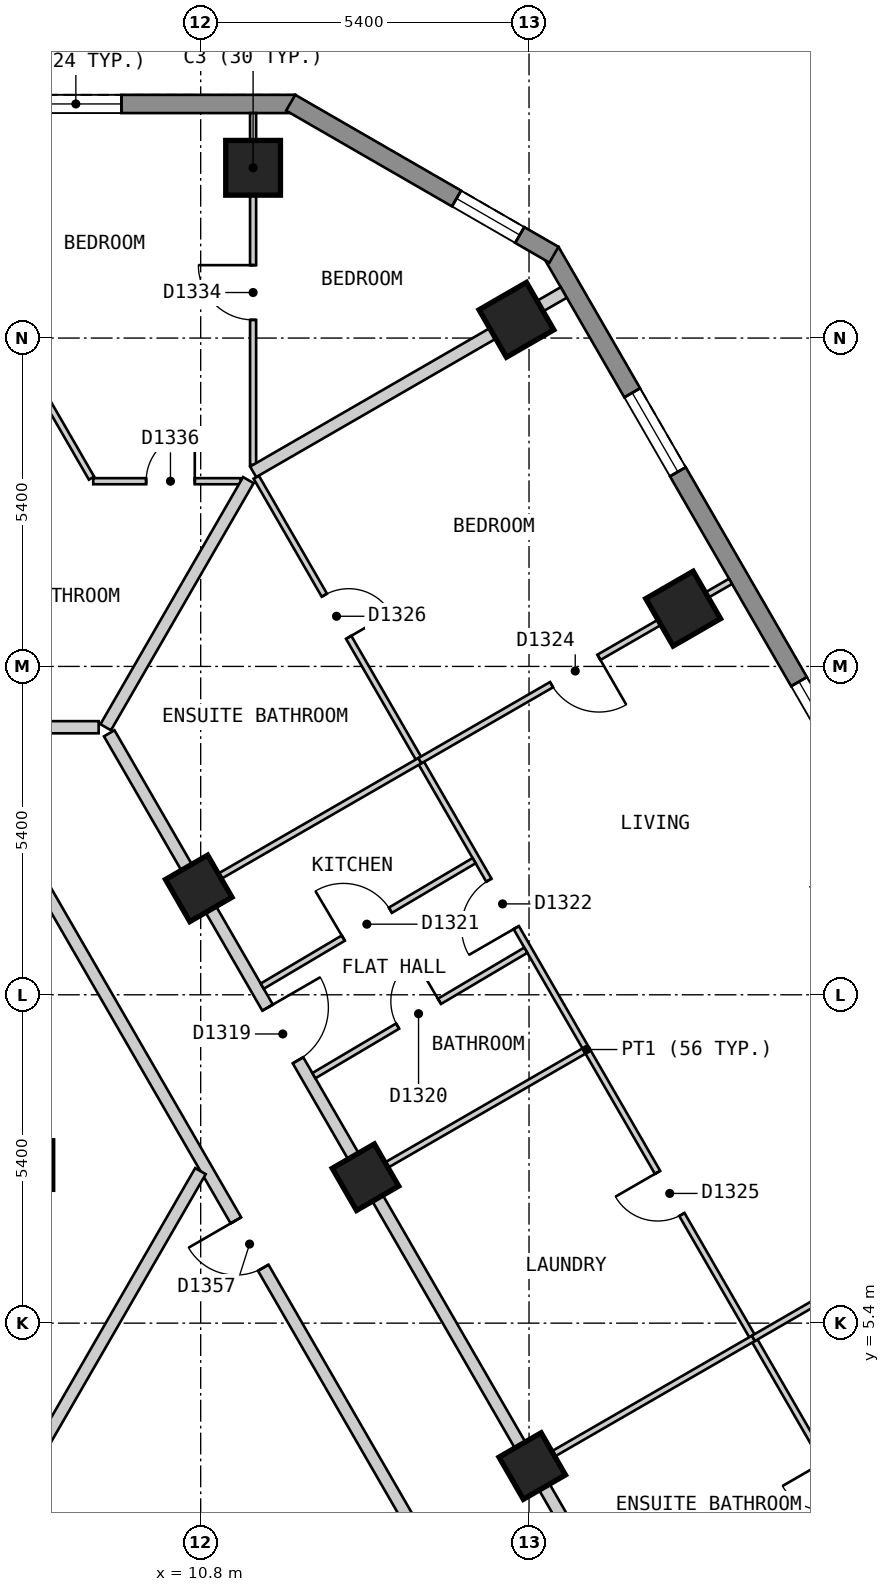
"""IFC4 building model, lengths in metres.
Left out: names, types, materials, properties, quantities, classifications, styles, units other than length and angle.
Written with IfcOpenShell. Run it as: python <this file> out.ifc"""

import sys

from ifc_helpers import new_model, si_unit, direction, frame, frame_2d, origin, origin_2d, place, context, subcontext, project, spatial, polyline, rectangle, outline, extrude, element, fill, save


model = new_model("IFC4")
c1 = context("Model", 3, precision=1e-05, world=origin(), true_north=direction((0.0, 1.0)))
c2 = subcontext(c1, "Body", "Model", "MODEL_VIEW")
j1 = project(units=[si_unit("LENGTHUNIT", "METRE"), si_unit("PLANEANGLEUNIT", "RADIAN")], contexts=[c1])
p1 = place(None, origin())
s1 = spatial("IfcSite", under=j1, at=p1, CompositionType="ELEMENT")
p2 = place(p1, origin())
s2 = spatial("IfcBuilding", under=s1, at=p2, CompositionType="ELEMENT")
p3 = place(p2, frame((0.0, 0.0, 147.6)))
s3 = spatial("IfcBuildingStorey", under=s2, at=p3, CompositionType="ELEMENT", Elevation=147.6)
for number, where, z_axis, x_axis in (
    (1, (11.662, 24.4, 0.0), (0.0, 0.0, 1.0), (-1.0, 0.0, 0.0)),
    (2, (18.735, 17.15, 0.0), (0.0, 0.0, 1.0), (-0.5, 0.866, 0.0)),
    (3, (15.993, 21.9, 0.0), (0.0, 0.0, 1.0), (-0.5, 0.866, 0.0)),
):
    element("IfcColumn", number, at=place(p3, frame(where, z_axis=z_axis, x_axis=x_axis)), inside=s3, PredefinedType="COLUMN", context=c2, shape_type="SweptSolid", body=[
        extrude(rectangle(XDim=0.9, YDim=0.9, at=origin_2d()), origin(), (0.0, 0.0, 1.0), 3.0),
    ])
for number, where, z_axis, x_axis in (
    (4, (16.253, 3.05, 0.0), (0.0, 0.0, 1.0), (-0.5, 0.866, 0.0)),
    (5, (13.51, 7.8, 0.0), (0.0, 0.0, 1.0), (-0.5, 0.866, 0.0)),
    (6, (7.967, 8.0, 0.0), (0.0, 0.0, 1.0), (1.0, 0.0, 0.0)),
    (7, (10.768, 12.55, 0.0), (0.0, 0.0, 1.0), (-0.5, 0.866, 0.0)),
):
    element("IfcColumn", number, at=place(p3, frame(where, z_axis=z_axis, x_axis=x_axis)), inside=s3, PredefinedType="COLUMN", context=c2, shape_type="SweptSolid", body=[
        extrude(rectangle(XDim=0.8, YDim=0.8, at=origin_2d()), origin(), (0.0, 0.0, 1.0), 3.0),
    ])
p4 = place(p3, frame((12.355, 25.45, 0.0), z_axis=(0.0, 0.0, 1.0), x_axis=(-1.0, 0.0, 0.0)))
e8 = element("IfcWall", 8, at=p4, inside=s3, PredefinedType="SOLIDWALL", context=c2, shape_type="SweptSolid", body=[
    extrude(outline(polyline([(0.0, -0.15), (24.71, -0.15), (24.63, 0.15), (0.08, 0.15), (0.0, -0.15)])), origin(), (0.0, 0.0, 1.0), 2.7),
])
p5 = place(p4, frame((2.858, 0.0, 0.15)))
e9 = element("IfcOpeningElement", 9, at=p5, cuts=e8, PredefinedType="OPENING", context=c2, shape_type="SweptSolid", body=[
    extrude(rectangle(XDim=1.5, YDim=2.1, at=frame_2d((0.75, 1.05))), frame((0.0, 0.16, 0.0), z_axis=(0.0, -1.0, 0.0), x_axis=(1.0, 0.0, 0.0)), (0.0, 0.0, 1.0), 0.32),
])
p6 = place(p4, frame((8.689, 0.0, 0.15)))
e10 = element("IfcOpeningElement", 10, at=p6, cuts=e8, PredefinedType="OPENING", context=c2, shape_type="SweptSolid", body=[
    extrude(rectangle(XDim=1.5, YDim=2.1, at=frame_2d((0.75, 1.05))), frame((0.0, 0.16, 0.0), z_axis=(0.0, -1.0, 0.0), x_axis=(1.0, 0.0, 0.0)), (0.0, 0.0, 1.0), 0.32),
])
p7 = place(p4, frame((14.521, 0.0, 0.15)))
e11 = element("IfcOpeningElement", 11, at=p7, cuts=e8, PredefinedType="OPENING", context=c2, shape_type="SweptSolid", body=[
    extrude(rectangle(XDim=1.5, YDim=2.1, at=frame_2d((0.75, 1.05))), frame((0.0, 0.16, 0.0), z_axis=(0.0, -1.0, 0.0), x_axis=(1.0, 0.0, 0.0)), (0.0, 0.0, 1.0), 0.32),
])
p8 = place(p4, frame((20.352, 0.0, 0.15)))
e12 = element("IfcOpeningElement", 12, at=p8, cuts=e8, PredefinedType="OPENING", context=c2, shape_type="SweptSolid", body=[
    extrude(rectangle(XDim=1.5, YDim=2.1, at=frame_2d((0.75, 1.05))), frame((0.0, 0.16, 0.0), z_axis=(0.0, -1.0, 0.0), x_axis=(1.0, 0.0, 0.0)), (0.0, 0.0, 1.0), 0.32),
])
p9 = place(p3, frame((28.218, 2.825, 0.0), z_axis=(0.0, 0.0, 1.0), x_axis=(-0.500020536353, 0.866013546791, 0.0)))
e13 = element("IfcWall", 13, at=p9, inside=s3, PredefinedType="SOLIDWALL", context=c2, shape_type="SweptSolid", body=[
    extrude(outline(polyline([(0.0, -0.15), (23.325, -0.15), (23.245, 0.15), (0.08, 0.15), (0.0, -0.15)])), origin(), (0.0, 0.0, 1.0), 2.7),
])
p10 = place(p9, frame((2.685, 0.0, 0.15)))
e14 = element("IfcOpeningElement", 14, at=p10, cuts=e13, PredefinedType="OPENING", context=c2, shape_type="SweptSolid", body=[
    extrude(rectangle(XDim=1.5, YDim=2.1, at=frame_2d((0.75, 1.05))), frame((0.0, 0.16, 0.0), z_axis=(0.0, -1.0, 0.0), x_axis=(1.0, 0.0, 0.0)), (0.0, 0.0, 1.0), 0.32),
])
p11 = place(p9, frame((8.17, 0.0, 0.15)))
e15 = element("IfcOpeningElement", 15, at=p11, cuts=e13, PredefinedType="OPENING", context=c2, shape_type="SweptSolid", body=[
    extrude(rectangle(XDim=1.5, YDim=2.1, at=frame_2d((0.75, 1.05))), frame((0.0, 0.16, 0.0), z_axis=(0.0, -1.0, 0.0), x_axis=(1.0, 0.0, 0.0)), (0.0, 0.0, 1.0), 0.32),
])
p12 = place(p9, frame((13.655, 0.0, 0.15)))
e16 = element("IfcOpeningElement", 16, at=p12, cuts=e13, PredefinedType="OPENING", context=c2, shape_type="SweptSolid", body=[
    extrude(rectangle(XDim=1.5, YDim=2.1, at=frame_2d((0.75, 1.05))), frame((0.0, 0.16, 0.0), z_axis=(0.0, -1.0, 0.0), x_axis=(1.0, 0.0, 0.0)), (0.0, 0.0, 1.0), 0.32),
])
p13 = place(p9, frame((19.14, 0.0, 0.15)))
e17 = element("IfcOpeningElement", 17, at=p13, cuts=e13, PredefinedType="OPENING", context=c2, shape_type="SweptSolid", body=[
    extrude(rectangle(XDim=1.5, YDim=2.1, at=frame_2d((0.75, 1.05))), frame((0.0, 0.16, 0.0), z_axis=(0.0, -1.0, 0.0), x_axis=(1.0, 0.0, 0.0)), (0.0, 0.0, 1.0), 0.32),
])
p14 = place(p3, frame((16.61, 22.97, 0.0), z_axis=(0.0, 0.0, 1.0), x_axis=(-0.866022959057, 0.500004234368, 0.0)))
e18 = element("IfcWall", 18, at=p14, inside=s3, PredefinedType="SOLIDWALL", context=c2, shape_type="SweptSolid", body=[
    extrude(outline(polyline([(0.0, -0.15), (5.0, -0.15), (4.92, 0.15), (0.08, 0.15), (0.0, -0.15)])), origin(), (0.0, 0.0, 1.0), 2.7),
])
p15 = place(p14, frame((0.65, 0.0, 0.15)))
e19 = element("IfcOpeningElement", 19, at=p15, cuts=e18, PredefinedType="OPENING", context=c2, shape_type="SweptSolid", body=[
    extrude(rectangle(XDim=1.2, YDim=2.1, at=frame_2d((0.6, 1.05))), frame((0.0, 0.16, 0.0), z_axis=(0.0, -1.0, 0.0), x_axis=(1.0, 0.0, 0.0)), (0.0, 0.0, 1.0), 0.32),
])
p16 = place(p3, frame((7.967, 13.0, 0.0), z_axis=(0.0, 0.0, 1.0), x_axis=(0.50003774998, -0.866003607726, 0.0)))
e20 = element("IfcWall", 20, at=p16, inside=s3, PredefinedType="PARTITIONING", context=c2, shape_type="SweptSolid", body=[
    extrude(rectangle(XDim=14.433, YDim=0.2, at=frame_2d((7.217, 0.0))), origin(), (0.0, 0.0, 1.0), 2.7),
])
p17 = place(p16, frame((6.824, 0.0, 0.0)))
e21 = element("IfcOpeningElement", 21, at=p17, cuts=e20, PredefinedType="OPENING", context=c2, shape_type="SweptSolid", body=[
    extrude(rectangle(XDim=0.9, YDim=2.1, at=frame_2d((0.45, 1.05))), frame((0.0, 0.11, 0.0), z_axis=(0.0, -1.0, 0.0), x_axis=(1.0, 0.0, 0.0)), (0.0, 0.0, 1.0), 0.22),
])
p18 = place(p3, frame((9.296, 15.1, 0.0), z_axis=(0.0, 0.0, 1.0), x_axis=(0.499974024244, -0.866040400375, 0.0)))
e22 = element("IfcWall", 22, at=p18, inside=s3, PredefinedType="PARTITIONING", context=c2, shape_type="SweptSolid", body=[
    extrude(rectangle(XDim=16.857, YDim=0.2, at=frame_2d((8.429, 0.0))), origin(), (0.0, 0.0, 1.0), 2.7),
])
p19 = place(p18, frame((5.209, 0.0, 0.0)))
e23 = element("IfcOpeningElement", 23, at=p19, cuts=e22, PredefinedType="OPENING", context=c2, shape_type="SweptSolid", body=[
    extrude(rectangle(XDim=1.0, YDim=2.1, at=frame_2d((0.5, 1.05))), frame((0.0, 0.11, 0.0), z_axis=(0.0, -1.0, 0.0), x_axis=(1.0, 0.0, 0.0)), (0.0, 0.0, 1.0), 0.22),
])
p20 = place(p3, frame((6.697, 15.2, 0.0), z_axis=(0.0, 0.0, 1.0), x_axis=(1.0, 0.0, 0.0)))
e24 = element("IfcWall", 24, at=p20, inside=s3, PredefinedType="PARTITIONING", context=c2, shape_type="SweptSolid", body=[
    extrude(rectangle(XDim=2.425, YDim=0.2, at=frame_2d((1.212, 0.0))), origin(), (0.0, 0.0, 1.0), 2.7),
])
p21 = place(p3, frame((7.028, 1.373, 0.0), z_axis=(0.0, 0.0, 1.0), x_axis=(0.499954271211, 0.866051803703, 0.0)))
e25 = element("IfcWall", 25, at=p21, inside=s3, PredefinedType="PARTITIONING", context=c2, shape_type="SweptSolid", body=[
    extrude(rectangle(XDim=7.536, YDim=0.2, at=frame_2d((3.768, 0.0))), origin(), (0.0, 0.0, 1.0), 2.7),
])
p22 = place(p3, frame((7.792, 21.396, 0.0), z_axis=(0.0, 0.0, 1.0), x_axis=(0.50012328804, -0.865954211699, 0.0)))
e26 = element("IfcWall", 26, at=p22, inside=s3, PredefinedType="PARTITIONING", context=c2, shape_type="SweptSolid", body=[
    extrude(rectangle(XDim=2.425, YDim=0.1, at=frame_2d((1.213, 0.0))), origin(), (0.0, 0.0, 1.0), 2.7),
])
p23 = place(p3, frame((11.713, 19.313, 0.0), z_axis=(0.0, 0.0, 1.0), x_axis=(0.499999523185, -0.866025679073, 0.0)))
e27 = element("IfcWall", 27, at=p23, inside=s3, PredefinedType="PARTITIONING", context=c2, shape_type="SweptSolid", body=[
    extrude(rectangle(XDim=21.738, YDim=0.1, at=frame_2d((10.869, 0.0))), origin(), (0.0, 0.0, 1.0), 2.7),
])
p24 = place(p23, frame((7.654, 0.0, 0.0)))
e28 = element("IfcOpeningElement", 28, at=p24, cuts=e27, PredefinedType="OPENING", context=c2, shape_type="SweptSolid", body=[
    extrude(rectangle(XDim=0.9, YDim=2.1, at=frame_2d((0.45, 1.05))), frame((0.0, 0.06, 0.0), z_axis=(0.0, -1.0, 0.0), x_axis=(1.0, 0.0, 0.0)), (0.0, 0.0, 1.0), 0.12),
])
p25 = place(p23, frame((13.202, 0.0, 0.0)))
e29 = element("IfcOpeningElement", 29, at=p25, cuts=e27, PredefinedType="OPENING", context=c2, shape_type="SweptSolid", body=[
    extrude(rectangle(XDim=0.8, YDim=2.1, at=frame_2d((0.4, 1.05))), frame((0.0, 0.06, 0.0), z_axis=(0.0, -1.0, 0.0), x_axis=(1.0, 0.0, 0.0)), (0.0, 0.0, 1.0), 0.12),
])
p26 = place(p23, frame((2.242, 0.0, 0.0)))
e30 = element("IfcOpeningElement", 30, at=p26, cuts=e27, PredefinedType="OPENING", context=c2, shape_type="SweptSolid", body=[
    extrude(rectangle(XDim=0.8, YDim=2.1, at=frame_2d((0.4, 1.05))), frame((0.0, 0.06, 0.0), z_axis=(0.0, -1.0, 0.0), x_axis=(1.0, 0.0, 0.0)), (0.0, 0.0, 1.0), 0.12),
])
p27 = place(p23, frame((18.696, 0.0, 0.0)))
e31 = element("IfcOpeningElement", 31, at=p27, cuts=e27, PredefinedType="OPENING", context=c2, shape_type="SweptSolid", body=[
    extrude(rectangle(XDim=0.8, YDim=2.1, at=frame_2d((0.4, 1.05))), frame((0.0, 0.06, 0.0), z_axis=(0.0, -1.0, 0.0), x_axis=(1.0, 0.0, 0.0)), (0.0, 0.0, 1.0), 0.12),
])
p28 = place(p3, frame((9.033, 19.246, 0.0), z_axis=(0.0, 0.0, 1.0), x_axis=(1.0, 0.0, 0.0)))
e32 = element("IfcWall", 32, at=p28, inside=s3, PredefinedType="PARTITIONING", context=c2, shape_type="SweptSolid", body=[
    extrude(rectangle(XDim=2.425, YDim=0.1, at=frame_2d((1.212, 0.0))), origin(), (0.0, 0.0, 1.0), 2.7),
])
p29 = place(p28, frame((0.87, 0.0, 0.0)))
e33 = element("IfcOpeningElement", 33, at=p29, cuts=e32, PredefinedType="OPENING", context=c2, shape_type="SweptSolid", body=[
    extrude(rectangle(XDim=0.8, YDim=2.1, at=frame_2d((0.4, 1.05))), frame((0.0, 0.06, 0.0), z_axis=(0.0, -1.0, 0.0), x_axis=(1.0, 0.0, 0.0)), (0.0, 0.0, 1.0), 0.12),
])
p30 = place(p3, frame((11.662, 19.514, 0.0), z_axis=(0.0, 0.0, 1.0), x_axis=(0.0, 1.0, 0.0)))
e34 = element("IfcWall", 34, at=p30, inside=s3, PredefinedType="PARTITIONING", context=c2, shape_type="SweptSolid", body=[
    extrude(rectangle(XDim=5.786, YDim=0.1, at=frame_2d((2.893, 0.0))), origin(), (0.0, 0.0, 1.0), 2.7),
])
p31 = place(p30, frame((2.385, 0.0, 0.0)))
e35 = element("IfcOpeningElement", 35, at=p31, cuts=e34, PredefinedType="OPENING", context=c2, shape_type="SweptSolid", body=[
    extrude(rectangle(XDim=0.9, YDim=2.1, at=frame_2d((0.45, 1.05))), frame((0.0, 0.06, 0.0), z_axis=(0.0, -1.0, 0.0), x_axis=(1.0, 0.0, 0.0)), (0.0, 0.0, 1.0), 0.12),
])
p32 = place(p3, frame((16.339, 3.1, 0.0), z_axis=(0.0, 0.0, 1.0), x_axis=(0.866050731258, 0.499956128963, 0.0)))
e36 = element("IfcWall", 36, at=p32, inside=s3, PredefinedType="PARTITIONING", context=c2, shape_type="SweptSolid", body=[
    extrude(rectangle(XDim=4.1, YDim=0.1, at=frame_2d((2.05, 0.0))), origin(), (0.0, 0.0, 1.0), 2.7),
])
p33 = place(p3, frame((13.597, 7.85, 0.0), z_axis=(0.0, 0.0, 1.0), x_axis=(0.866015917575, 0.500016430238, 0.0)))
e37 = element("IfcWall", 37, at=p33, inside=s3, PredefinedType="PARTITIONING", context=c2, shape_type="SweptSolid", body=[
    extrude(rectangle(XDim=4.05, YDim=0.1, at=frame_2d((2.025, 0.0))), origin(), (0.0, 0.0, 1.0), 2.7),
])
p34 = place(p3, frame((10.854, 12.6, 0.0), z_axis=(0.0, 0.0, 1.0), x_axis=(0.86606561423, 0.499930346997, 0.0)))
e38 = element("IfcWall", 38, at=p34, inside=s3, PredefinedType="PARTITIONING", context=c2, shape_type="SweptSolid", body=[
    extrude(rectangle(XDim=4.1, YDim=0.1, at=frame_2d((2.05, 0.0))), origin(), (0.0, 0.0, 1.0), 2.7),
])
p35 = place(p3, frame((11.812, 10.942, 0.0), z_axis=(0.0, 0.0, 1.0), x_axis=(0.860404104761, 0.509612378687, 0.0)))
e39 = element("IfcWall", 39, at=p35, inside=s3, PredefinedType="PARTITIONING", context=c2, shape_type="SweptSolid", body=[
    extrude(rectangle(XDim=4.051, YDim=0.1, at=frame_2d((2.025, 0.0))), origin(), (0.0, 0.0, 1.0), 2.7),
])
p36 = place(p35, frame((1.55, 0.0, 0.0)))
e40 = element("IfcOpeningElement", 40, at=p36, cuts=e39, PredefinedType="OPENING", context=c2, shape_type="SweptSolid", body=[
    extrude(rectangle(XDim=0.9, YDim=2.1, at=frame_2d((0.45, 1.05))), frame((0.0, 0.06, 0.0), z_axis=(0.0, -1.0, 0.0), x_axis=(1.0, 0.0, 0.0)), (0.0, 0.0, 1.0), 0.12),
])
p37 = place(p3, frame((12.662, 9.47, 0.0), z_axis=(0.0, 0.0, 1.0), x_axis=(0.860520594262, 0.509415652341, 0.0)))
e41 = element("IfcWall", 41, at=p37, inside=s3, PredefinedType="PARTITIONING", context=c2, shape_type="SweptSolid", body=[
    extrude(rectangle(XDim=4.05, YDim=0.1, at=frame_2d((2.025, 0.0))), origin(), (0.0, 0.0, 1.0), 2.7),
])
p38 = place(p37, frame((1.6, 0.0, 0.0)))
e42 = element("IfcOpeningElement", 42, at=p38, cuts=e41, PredefinedType="OPENING", context=c2, shape_type="SweptSolid", body=[
    extrude(rectangle(XDim=0.8, YDim=2.1, at=frame_2d((0.4, 1.05))), frame((0.0, 0.06, 0.0), z_axis=(0.0, -1.0, 0.0), x_axis=(1.0, 0.0, 0.0)), (0.0, 0.0, 1.0), 0.12),
])
p39 = place(p3, frame((9.238, 15.2, 0.0), z_axis=(0.0, 0.0, 1.0), x_axis=(0.49993863487, 0.86606083006, 0.0)))
e43 = element("IfcWall", 43, at=p39, inside=s3, PredefinedType="PARTITIONING", context=c2, shape_type="SweptSolid", body=[
    extrude(rectangle(XDim=4.692, YDim=0.2, at=frame_2d((2.346, 0.0))), origin(), (0.0, 0.0, 1.0), 2.7),
])
p40 = place(p3, frame((11.663, 19.4, 0.0), z_axis=(0.0, 0.0, 1.0), x_axis=(0.865941558533, 0.500145196124, 0.0)))
e44 = element("IfcWall", 44, at=p40, inside=s3, PredefinedType="PARTITIONING", context=c2, shape_type="SweptSolid", body=[
    extrude(rectangle(XDim=5.899, YDim=0.2, at=frame_2d((2.949, 0.0))), origin(), (0.0, 0.0, 1.0), 2.7),
])
p41 = place(p3, frame((19.89, 5.15, 0.0), z_axis=(0.0, 0.0, 1.0), x_axis=(0.865993310977, 0.500055582255, 0.0)))
e45 = element("IfcWall", 45, at=p41, inside=s3, PredefinedType="PARTITIONING", context=c2, shape_type="SweptSolid", body=[
    extrude(rectangle(XDim=5.9, YDim=0.1, at=frame_2d((2.95, 0.0))), origin(), (0.0, 0.0, 1.0), 2.7),
])
p42 = place(p41, frame((2.5, 0.0, 0.0)))
e46 = element("IfcOpeningElement", 46, at=p42, cuts=e45, PredefinedType="OPENING", context=c2, shape_type="SweptSolid", body=[
    extrude(rectangle(XDim=0.9, YDim=2.1, at=frame_2d((0.45, 1.05))), frame((0.0, 0.06, 0.0), z_axis=(0.0, -1.0, 0.0), x_axis=(1.0, 0.0, 0.0)), (0.0, 0.0, 1.0), 0.12),
])
p43 = place(p3, frame((14.405, 14.65, 0.0), z_axis=(0.0, 0.0, 1.0), x_axis=(0.866054644421, 0.499949350311, 0.0)))
e47 = element("IfcWall", 47, at=p43, inside=s3, PredefinedType="PARTITIONING", context=c2, shape_type="SweptSolid", body=[
    extrude(rectangle(XDim=5.899, YDim=0.1, at=frame_2d((2.949, 0.0))), origin(), (0.0, 0.0, 1.0), 2.7),
])
p44 = place(p43, frame((2.5, 0.0, 0.0)))
e48 = element("IfcOpeningElement", 48, at=p44, cuts=e47, PredefinedType="OPENING", context=c2, shape_type="SweptSolid", body=[
    extrude(rectangle(XDim=0.9, YDim=2.1, at=frame_2d((0.45, 1.05))), frame((0.0, 0.06, 0.0), z_axis=(0.0, -1.0, 0.0), x_axis=(1.0, 0.0, 0.0)), (0.0, 0.0, 1.0), 0.12),
])
p45 = place(p5, origin())
e49 = element("IfcWindow", 49, at=p45, inside=s3, PartitioningType="SINGLE_PANEL", PredefinedType="WINDOW", context=c2, shape_type="SweptSolid", body=[
    extrude(rectangle(XDim=1.5, YDim=2.1, at=frame_2d((0.75, 1.05))), frame((0.0, 0.03, 0.0), z_axis=(0.0, -1.0, 0.0), x_axis=(1.0, 0.0, 0.0)), (0.0, 0.0, 1.0), 0.06),
])
fill(e9, e49)
p46 = place(p12, origin())
e50 = element("IfcWindow", 50, at=p46, inside=s3, PartitioningType="SINGLE_PANEL", PredefinedType="WINDOW", context=c2, shape_type="SweptSolid", body=[
    extrude(rectangle(XDim=1.5, YDim=2.1, at=frame_2d((0.75, 1.05))), frame((0.0, 0.03, 0.0), z_axis=(0.0, -1.0, 0.0), x_axis=(1.0, 0.0, 0.0)), (0.0, 0.0, 1.0), 0.06),
])
fill(e16, e50)
p47 = place(p13, origin())
e51 = element("IfcWindow", 51, at=p47, inside=s3, PartitioningType="SINGLE_PANEL", PredefinedType="WINDOW", context=c2, shape_type="SweptSolid", body=[
    extrude(rectangle(XDim=1.5, YDim=2.1, at=frame_2d((0.75, 1.05))), frame((0.0, 0.03, 0.0), z_axis=(0.0, -1.0, 0.0), x_axis=(1.0, 0.0, 0.0)), (0.0, 0.0, 1.0), 0.06),
])
fill(e17, e51)
p48 = place(p15, origin())
e52 = element("IfcWindow", 52, at=p48, inside=s3, PartitioningType="SINGLE_PANEL", PredefinedType="WINDOW", context=c2, shape_type="SweptSolid", body=[
    extrude(rectangle(XDim=1.2, YDim=2.1, at=frame_2d((0.6, 1.05))), frame((0.0, 0.03, 0.0), z_axis=(0.0, -1.0, 0.0), x_axis=(1.0, 0.0, 0.0)), (0.0, 0.0, 1.0), 0.06),
])
fill(e19, e52)
p49 = place(p19, origin())
e53 = element("IfcDoor", 53, at=p49, inside=s3, OperationType="SINGLE_SWING_LEFT", PredefinedType="DOOR", context=c2, shape_type="SweptSolid", body=[
    extrude(rectangle(XDim=1.0, YDim=2.1, at=frame_2d((0.5, 1.05))), frame((0.0, 0.025, 0.0), z_axis=(0.0, -1.0, 0.0), x_axis=(1.0, 0.0, 0.0)), (0.0, 0.0, 1.0), 0.05),
])
fill(e23, e53)
p50 = place(p38, origin())
e54 = element("IfcDoor", 54, at=p50, inside=s3, OperationType="SINGLE_SWING_RIGHT", PredefinedType="DOOR", context=c2, shape_type="SweptSolid", body=[
    extrude(rectangle(XDim=0.8, YDim=2.1, at=frame_2d((0.4, 1.05))), frame((0.0, 0.025, 0.0), z_axis=(0.0, -1.0, 0.0), x_axis=(1.0, 0.0, 0.0)), (0.0, 0.0, 1.0), 0.05),
])
fill(e42, e54)
p51 = place(p36, origin())
e55 = element("IfcDoor", 55, at=p51, inside=s3, OperationType="SINGLE_SWING_LEFT", PredefinedType="DOOR", context=c2, shape_type="SweptSolid", body=[
    extrude(rectangle(XDim=0.9, YDim=2.1, at=frame_2d((0.45, 1.05))), frame((0.0, 0.025, 0.0), z_axis=(0.0, -1.0, 0.0), x_axis=(1.0, 0.0, 0.0)), (0.0, 0.0, 1.0), 0.05),
])
fill(e40, e55)
p52 = place(p24, origin())
e56 = element("IfcDoor", 56, at=p52, inside=s3, OperationType="SINGLE_SWING_RIGHT", PredefinedType="DOOR", context=c2, shape_type="SweptSolid", body=[
    extrude(rectangle(XDim=0.9, YDim=2.1, at=frame_2d((0.45, 1.05))), frame((0.0, 0.025, 0.0), z_axis=(0.0, -1.0, 0.0), x_axis=(1.0, 0.0, 0.0)), (0.0, 0.0, 1.0), 0.05),
])
fill(e28, e56)
p53 = place(p44, origin())
e57 = element("IfcDoor", 57, at=p53, inside=s3, OperationType="SINGLE_SWING_RIGHT", PredefinedType="DOOR", context=c2, shape_type="SweptSolid", body=[
    extrude(rectangle(XDim=0.9, YDim=2.1, at=frame_2d((0.45, 1.05))), frame((0.0, 0.025, 0.0), z_axis=(0.0, -1.0, 0.0), x_axis=(1.0, 0.0, 0.0)), (0.0, 0.0, 1.0), 0.05),
])
fill(e48, e57)
p54 = place(p25, origin())
e58 = element("IfcDoor", 58, at=p54, inside=s3, OperationType="SINGLE_SWING_LEFT", PredefinedType="DOOR", context=c2, shape_type="SweptSolid", body=[
    extrude(rectangle(XDim=0.8, YDim=2.1, at=frame_2d((0.4, 1.05))), frame((0.0, 0.025, 0.0), z_axis=(0.0, -1.0, 0.0), x_axis=(1.0, 0.0, 0.0)), (0.0, 0.0, 1.0), 0.05),
])
fill(e29, e58)
p55 = place(p26, origin())
e59 = element("IfcDoor", 59, at=p55, inside=s3, OperationType="SINGLE_SWING_RIGHT", PredefinedType="DOOR", context=c2, shape_type="SweptSolid", body=[
    extrude(rectangle(XDim=0.8, YDim=2.1, at=frame_2d((0.4, 1.05))), frame((0.0, 0.025, 0.0), z_axis=(0.0, -1.0, 0.0), x_axis=(1.0, 0.0, 0.0)), (0.0, 0.0, 1.0), 0.05),
])
fill(e30, e59)
p56 = place(p31, origin())
e60 = element("IfcDoor", 60, at=p56, inside=s3, OperationType="SINGLE_SWING_RIGHT", PredefinedType="DOOR", context=c2, shape_type="SweptSolid", body=[
    extrude(rectangle(XDim=0.9, YDim=2.1, at=frame_2d((0.45, 1.05))), frame((0.0, 0.025, 0.0), z_axis=(0.0, -1.0, 0.0), x_axis=(1.0, 0.0, 0.0)), (0.0, 0.0, 1.0), 0.05),
])
fill(e35, e60)
p57 = place(p29, origin())
e61 = element("IfcDoor", 61, at=p57, inside=s3, OperationType="SINGLE_SWING_RIGHT", PredefinedType="DOOR", context=c2, shape_type="SweptSolid", body=[
    extrude(rectangle(XDim=0.8, YDim=2.1, at=frame_2d((0.4, 1.05))), frame((0.0, 0.025, 0.0), z_axis=(0.0, -1.0, 0.0), x_axis=(1.0, 0.0, 0.0)), (0.0, 0.0, 1.0), 0.05),
])
fill(e33, e61)
p58 = place(p17, origin())
e62 = element("IfcDoor", 62, at=p58, inside=s3, OperationType="SINGLE_SWING_LEFT", PredefinedType="DOOR", context=c2, shape_type="SweptSolid", body=[
    extrude(rectangle(XDim=0.9, YDim=2.1, at=frame_2d((0.45, 1.05))), frame((0.0, 0.025, 0.0), z_axis=(0.0, -1.0, 0.0), x_axis=(1.0, 0.0, 0.0)), (0.0, 0.0, 1.0), 0.05),
])
fill(e21, e62)
save(model, sys.argv[1])
